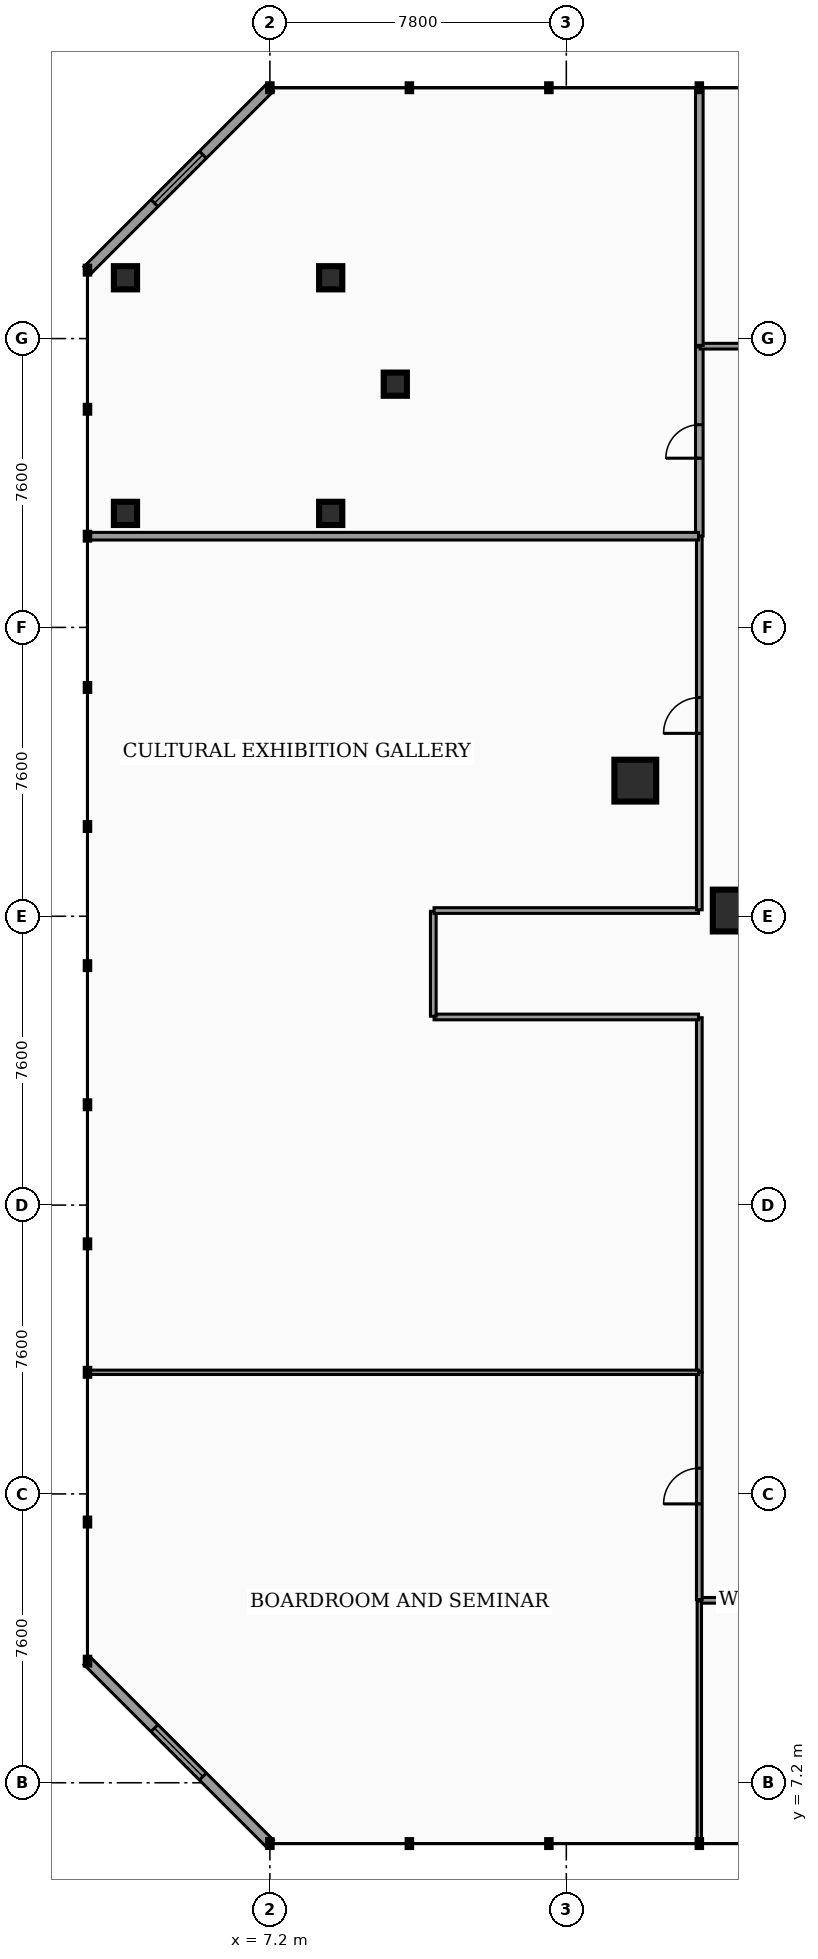
"""IFC4 building model, lengths in metres.
Left out: names, types, materials, properties, quantities, classifications, styles, units other than length and angle.
Written with IfcOpenShell. Run it as: python <this file> out.ifc"""

import sys

from ifc_helpers import new_model, si_unit, direction, frame, frame_2d, origin, origin_2d, place, context, subcontext, project, spatial, rectangle, hollow_rectangle, hollow_circle, extrude, element, fill, save


model = new_model("IFC4")
c1 = context("Model", 3, precision=1e-05, world=origin(), true_north=direction((0.0, 1.0)))
c2 = subcontext(c1, "Body", "Model", "MODEL_VIEW")
j1 = project(units=[si_unit("LENGTHUNIT", "METRE"), si_unit("PLANEANGLEUNIT", "RADIAN")], contexts=[c1])
p1 = place(None, origin())
s1 = spatial("IfcSite", under=j1, at=p1, CompositionType="ELEMENT")
p2 = place(p1, origin())
s2 = spatial("IfcBuilding", under=s1, at=p2, CompositionType="ELEMENT")
p3 = place(p2, frame((0.0, 0.0, 13.94)))
s3 = spatial("IfcBuildingStorey", under=s2, at=p3, CompositionType="ELEMENT", Elevation=13.94)
for number, where, z_axis, x_axis in (
    (1, (16.815, 33.568, 0.0), (0.0, 0.0, 1.0), (1.0, 0.0, 0.0)),
    (2, (19.405, 30.15, 0.0), (0.0, 0.0, 1.0), (1.0, 0.0, 0.0)),
):
    element("IfcColumn", number, at=place(p3, frame(where, z_axis=z_axis, x_axis=x_axis)), inside=s3, PredefinedType="COLUMN", context=c2, shape_type="SweptSolid", body=[
        extrude(hollow_rectangle(XDim=1.1, YDim=1.1, WallThickness=0.055, at=origin_2d()), origin(), (0.0, 0.0, 1.0), 4.14),
    ])
p4 = place(p3, frame((10.5, 44.0, 0.0), z_axis=(0.0, 0.0, 1.0), x_axis=(1.0, 0.0, 0.0)))
e3 = element("IfcColumn", 3, at=p4, inside=s3, PredefinedType="COLUMN", context=c2, shape_type="SweptSolid", body=[
    extrude(hollow_circle(Radius=0.305, WallThickness=0.025, at=origin_2d()), origin(), (0.0, 0.0, 1.0), 4.14),
])
p5 = place(p3, frame((3.4, 40.6, 0.0), z_axis=(0.0, 0.0, 1.0), x_axis=(1.0, 0.0, 0.0)))
e4 = element("IfcColumn", 4, at=p5, inside=s3, PredefinedType="COLUMN", context=c2, shape_type="SweptSolid", body=[
    extrude(hollow_circle(Radius=0.305, WallThickness=0.025, at=origin_2d()), origin(), (0.0, 0.0, 1.0), 4.11),
])
p6 = place(p3, frame((8.8, 40.6, 0.0), z_axis=(0.0, 0.0, 1.0), x_axis=(1.0, 0.0, 0.0)))
e5 = element("IfcColumn", 5, at=p6, inside=s3, PredefinedType="COLUMN", context=c2, shape_type="SweptSolid", body=[
    extrude(hollow_circle(Radius=0.305, WallThickness=0.025, at=origin_2d()), origin(), (0.0, 0.0, 1.0), 4.14),
])
p7 = place(p3, frame((3.4, 46.8, 0.0), z_axis=(0.0, 0.0, 1.0), x_axis=(1.0, 0.0, 0.0)))
e6 = element("IfcColumn", 6, at=p7, inside=s3, PredefinedType="COLUMN", context=c2, shape_type="SweptSolid", body=[
    extrude(hollow_circle(Radius=0.305, WallThickness=0.025, at=origin_2d()), origin(), (0.0, 0.0, 1.0), 4.11),
])
p8 = place(p3, frame((8.8, 46.8, 0.0), z_axis=(0.0, 0.0, 1.0), x_axis=(1.0, 0.0, 0.0)))
e7 = element("IfcColumn", 7, at=p8, inside=s3, PredefinedType="COLUMN", context=c2, shape_type="SweptSolid", body=[
    extrude(hollow_circle(Radius=0.305, WallThickness=0.025, at=origin_2d()), origin(), (0.0, 0.0, 1.0), 4.14),
])
p9 = place(p3, frame((2.4, 47.0, 0.0), z_axis=(0.0, 0.0, 1.0), x_axis=(0.707106781187, 0.707106781187, 0.0)))
e8 = element("IfcWall", 8, at=p9, inside=s3, PredefinedType="STANDARD", context=c2, shape_type="SweptSolid", body=[
    extrude(rectangle(XDim=6.788, YDim=0.26, at=frame_2d((3.394, 0.0))), origin(), (0.0, 0.0, 1.0), 3.65),
])
p10 = place(p9, frame((2.494, 0.0, 0.7)))
e9 = element("IfcOpeningElement", 9, at=p10, cuts=e8, PredefinedType="OPENING", context=c2, shape_type="SweptSolid", body=[
    extrude(rectangle(XDim=1.8, YDim=2.1, at=frame_2d((0.9, 1.05))), frame((0.0, 0.14, 0.0), z_axis=(0.0, -1.0, 0.0), x_axis=(1.0, 0.0, 0.0)), (0.0, 0.0, 1.0), 0.28),
])
p11 = place(p3, frame((2.4, 10.4, 0.0), z_axis=(0.0, 0.0, 1.0), x_axis=(0.707124763888, -0.707088798028, 0.0)))
e10 = element("IfcWall", 10, at=p11, inside=s3, PredefinedType="STANDARD", context=c2, shape_type="SweptSolid", body=[
    extrude(rectangle(XDim=6.788, YDim=0.26, at=frame_2d((3.394, 0.0))), origin(), (0.0, 0.0, 1.0), 3.65),
])
p12 = place(p11, frame((2.494, 0.0, 0.7)))
e11 = element("IfcOpeningElement", 11, at=p12, cuts=e10, PredefinedType="OPENING", context=c2, shape_type="SweptSolid", body=[
    extrude(rectangle(XDim=1.8, YDim=2.1, at=frame_2d((0.9, 1.05))), frame((0.0, 0.14, 0.0), z_axis=(0.0, -1.0, 0.0), x_axis=(1.0, 0.0, 0.0)), (0.0, 0.0, 1.0), 0.28),
])
p13 = place(p3, frame((18.52, 12.0, 0.0), z_axis=(0.0, 0.0, 1.0), x_axis=(1.0, 0.0, 0.0)))
e12 = element("IfcWall", 12, at=p13, inside=s3, PredefinedType="PARTITIONING", context=c2, shape_type="SweptSolid", body=[
    extrude(rectangle(XDim=2.96, YDim=0.15, at=frame_2d((1.48, 0.0))), origin(), (0.0, 0.0, 1.0), 3.097),
])
p14 = place(p3, frame((18.5, 12.02, 0.0), z_axis=(0.0, 0.0, 1.0), x_axis=(0.0, 1.0, 0.0)))
e13 = element("IfcWall", 13, at=p14, inside=s3, PredefinedType="PARTITIONING", context=c2, shape_type="SweptSolid", body=[
    extrude(rectangle(XDim=5.975, YDim=0.15, at=frame_2d((2.988, 0.0))), origin(), (0.0, 0.0, 1.0), 3.097),
])
p15 = place(p14, frame((2.518, 0.0, 0.0)))
e14 = element("IfcOpeningElement", 14, at=p15, cuts=e13, PredefinedType="OPENING", context=c2, shape_type="SweptSolid", body=[
    extrude(rectangle(XDim=0.94, YDim=2.05, at=frame_2d((0.47, 1.025))), frame((0.0, 0.085, 0.0), z_axis=(0.0, -1.0, 0.0), x_axis=(1.0, 0.0, 0.0)), (0.0, 0.0, 1.0), 0.17),
])
p16 = place(p3, frame((18.5, 18.005, 0.0), z_axis=(0.0, 0.0, 1.0), x_axis=(0.0, 1.0, 0.0)))
e15 = element("IfcWall", 15, at=p16, inside=s3, PredefinedType="PARTITIONING", context=c2, shape_type="SweptSolid", body=[
    extrude(rectangle(XDim=9.325, YDim=0.15, at=frame_2d((4.663, 0.0))), origin(), (0.0, 0.0, 1.0), 3.097),
])
p17 = place(p3, frame((11.52, 27.35, 0.0), z_axis=(0.0, 0.0, 1.0), x_axis=(1.0, 0.0, 0.0)))
e16 = element("IfcWall", 16, at=p17, inside=s3, PredefinedType="PARTITIONING", context=c2, shape_type="SweptSolid", body=[
    extrude(rectangle(XDim=6.96, YDim=0.15, at=frame_2d((3.48, 0.0))), origin(), (0.0, 0.0, 1.0), 3.097),
])
p18 = place(p3, frame((11.5, 27.37, 0.0), z_axis=(0.0, 0.0, 1.0), x_axis=(0.0, 1.0, 0.0)))
e17 = element("IfcWall", 17, at=p18, inside=s3, PredefinedType="PARTITIONING", context=c2, shape_type="SweptSolid", body=[
    extrude(rectangle(XDim=2.76, YDim=0.15, at=frame_2d((1.38, 0.0))), origin(), (0.0, 0.0, 1.0), 3.097),
])
p19 = place(p3, frame((11.52, 30.15, 0.0), z_axis=(0.0, 0.0, 1.0), x_axis=(1.0, 0.0, 0.0)))
e18 = element("IfcWall", 18, at=p19, inside=s3, PredefinedType="PARTITIONING", context=c2, shape_type="SweptSolid", body=[
    extrude(rectangle(XDim=6.96, YDim=0.15, at=frame_2d((3.48, 0.0))), origin(), (0.0, 0.0, 1.0), 3.097),
])
p20 = place(p3, frame((18.5, 30.17, 0.0), z_axis=(0.0, 0.0, 1.0), x_axis=(0.0, 1.0, 0.0)))
e19 = element("IfcWall", 19, at=p20, inside=s3, PredefinedType="PARTITIONING", context=c2, shape_type="SweptSolid", body=[
    extrude(rectangle(XDim=9.825, YDim=0.15, at=frame_2d((4.913, 0.0))), origin(), (0.0, 0.0, 1.0), 3.097),
])
p21 = place(p20, frame((4.643, 0.0, 0.0)))
e20 = element("IfcOpeningElement", 20, at=p21, cuts=e19, PredefinedType="OPENING", context=c2, shape_type="SweptSolid", body=[
    extrude(rectangle(XDim=0.94, YDim=2.05, at=frame_2d((0.47, 1.025))), frame((0.0, 0.085, 0.0), z_axis=(0.0, -1.0, 0.0), x_axis=(1.0, 0.0, 0.0)), (0.0, 0.0, 1.0), 0.17),
])
p22 = place(p3, frame((18.5, 40.005, 0.0), z_axis=(0.0, 0.0, 1.0), x_axis=(0.0, 1.0, 0.0)))
e21 = element("IfcWall", 21, at=p22, inside=s3, PredefinedType="PARTITIONING", context=c2, shape_type="SweptSolid", body=[
    extrude(rectangle(XDim=4.975, YDim=0.2, at=frame_2d((2.488, 0.0))), origin(), (0.0, 0.0, 1.0), 3.097),
])
p23 = place(p22, frame((2.048, 0.0, 0.0)))
e22 = element("IfcOpeningElement", 22, at=p23, cuts=e21, PredefinedType="OPENING", context=c2, shape_type="SweptSolid", body=[
    extrude(rectangle(XDim=0.88, YDim=2.05, at=frame_2d((0.44, 1.025))), frame((0.0, 0.11, 0.0), z_axis=(0.0, -1.0, 0.0), x_axis=(1.0, 0.0, 0.0)), (0.0, 0.0, 1.0), 0.22),
])
p24 = place(p3, frame((18.52, 45.0, 0.0), z_axis=(0.0, 0.0, 1.0), x_axis=(1.0, 0.0, 0.0)))
e23 = element("IfcWall", 23, at=p24, inside=s3, PredefinedType="PARTITIONING", context=c2, shape_type="SweptSolid", body=[
    extrude(rectangle(XDim=2.96, YDim=0.15, at=frame_2d((1.48, 0.0))), origin(), (0.0, 0.0, 1.0), 3.097),
])
p25 = place(p3, frame((18.5, 5.615, 0.0), z_axis=(0.0, 0.0, 1.0), x_axis=(0.0, 1.0, 0.0)))
e24 = element("IfcWall", 24, at=p25, inside=s3, PredefinedType="MOVABLE", context=c2, shape_type="SweptSolid", body=[
    extrude(rectangle(XDim=6.365, YDim=0.115, at=frame_2d((3.183, 0.0))), origin(), (0.0, 0.0, 1.0), 3.097),
])
p26 = place(p3, frame((2.415, 18.0, 0.0), z_axis=(0.0, 0.0, 1.0), x_axis=(1.0, 0.0, 0.0)))
e25 = element("IfcWall", 25, at=p26, inside=s3, PredefinedType="MOVABLE", context=c2, shape_type="SweptSolid", body=[
    extrude(rectangle(XDim=16.065, YDim=0.115, at=frame_2d((8.032, 0.0))), origin(), (0.0, 0.0, 1.0), 3.097),
])
p27 = place(p3, frame((2.415, 40.0, 0.0), z_axis=(0.0, 0.0, 1.0), x_axis=(1.0, 0.0, 0.0)))
e26 = element("IfcWall", 26, at=p27, inside=s3, PredefinedType="PARTITIONING", context=c2, shape_type="SweptSolid", body=[
    extrude(rectangle(XDim=16.065, YDim=0.2, at=frame_2d((8.032, 0.0))), origin(), (0.0, 0.0, 1.0), 3.097),
])
p28 = place(p3, frame((18.5, 45.02, 0.0), z_axis=(0.0, 0.0, 1.0), x_axis=(0.0, 1.0, 0.0)))
e27 = element("IfcWall", 27, at=p28, inside=s3, PredefinedType="PARTITIONING", context=c2, shape_type="SweptSolid", body=[
    extrude(rectangle(XDim=6.765, YDim=0.2, at=frame_2d((3.382, 0.0))), origin(), (0.0, 0.0, 1.0), 3.097),
])
p29 = place(p10, origin())
e28 = element("IfcWindow", 28, at=p29, inside=s3, PartitioningType="SINGLE_PANEL", PredefinedType="WINDOW", context=c2, shape_type="SweptSolid", body=[
    extrude(rectangle(XDim=1.8, YDim=2.1, at=frame_2d((0.9, 1.05))), frame((0.0, 0.03, 0.0), z_axis=(0.0, -1.0, 0.0), x_axis=(1.0, 0.0, 0.0)), (0.0, 0.0, 1.0), 0.06),
])
fill(e9, e28)
p30 = place(p12, origin())
e29 = element("IfcWindow", 29, at=p30, inside=s3, PartitioningType="SINGLE_PANEL", PredefinedType="WINDOW", context=c2, shape_type="SweptSolid", body=[
    extrude(rectangle(XDim=1.8, YDim=2.1, at=frame_2d((0.9, 1.05))), frame((0.0, 0.03, 0.0), z_axis=(0.0, -1.0, 0.0), x_axis=(1.0, 0.0, 0.0)), (0.0, 0.0, 1.0), 0.06),
])
fill(e11, e29)
p31 = place(p15, origin())
e30 = element("IfcDoor", 30, at=p31, inside=s3, OperationType="SINGLE_SWING_LEFT", PredefinedType="DOOR", context=c2, shape_type="SweptSolid", body=[
    extrude(rectangle(XDim=0.94, YDim=2.05, at=frame_2d((0.47, 1.025))), frame((0.0, 0.025, 0.0), z_axis=(0.0, -1.0, 0.0), x_axis=(1.0, 0.0, 0.0)), (0.0, 0.0, 1.0), 0.05),
])
fill(e14, e30)
p32 = place(p21, origin())
e31 = element("IfcDoor", 31, at=p32, inside=s3, OperationType="SINGLE_SWING_LEFT", PredefinedType="DOOR", context=c2, shape_type="SweptSolid", body=[
    extrude(rectangle(XDim=0.94, YDim=2.05, at=frame_2d((0.47, 1.025))), frame((0.0, 0.025, 0.0), z_axis=(0.0, -1.0, 0.0), x_axis=(1.0, 0.0, 0.0)), (0.0, 0.0, 1.0), 0.05),
])
fill(e20, e31)
p33 = place(p23, origin())
e32 = element("IfcDoor", 32, at=p33, inside=s3, OperationType="SINGLE_SWING_LEFT", PredefinedType="DOOR", context=c2, shape_type="SweptSolid", body=[
    extrude(rectangle(XDim=0.88, YDim=2.05, at=frame_2d((0.44, 1.025))), frame((0.0, 0.025, 0.0), z_axis=(0.0, -1.0, 0.0), x_axis=(1.0, 0.0, 0.0)), (0.0, 0.0, 1.0), 0.05),
])
fill(e22, e32)
save(model, sys.argv[1])
